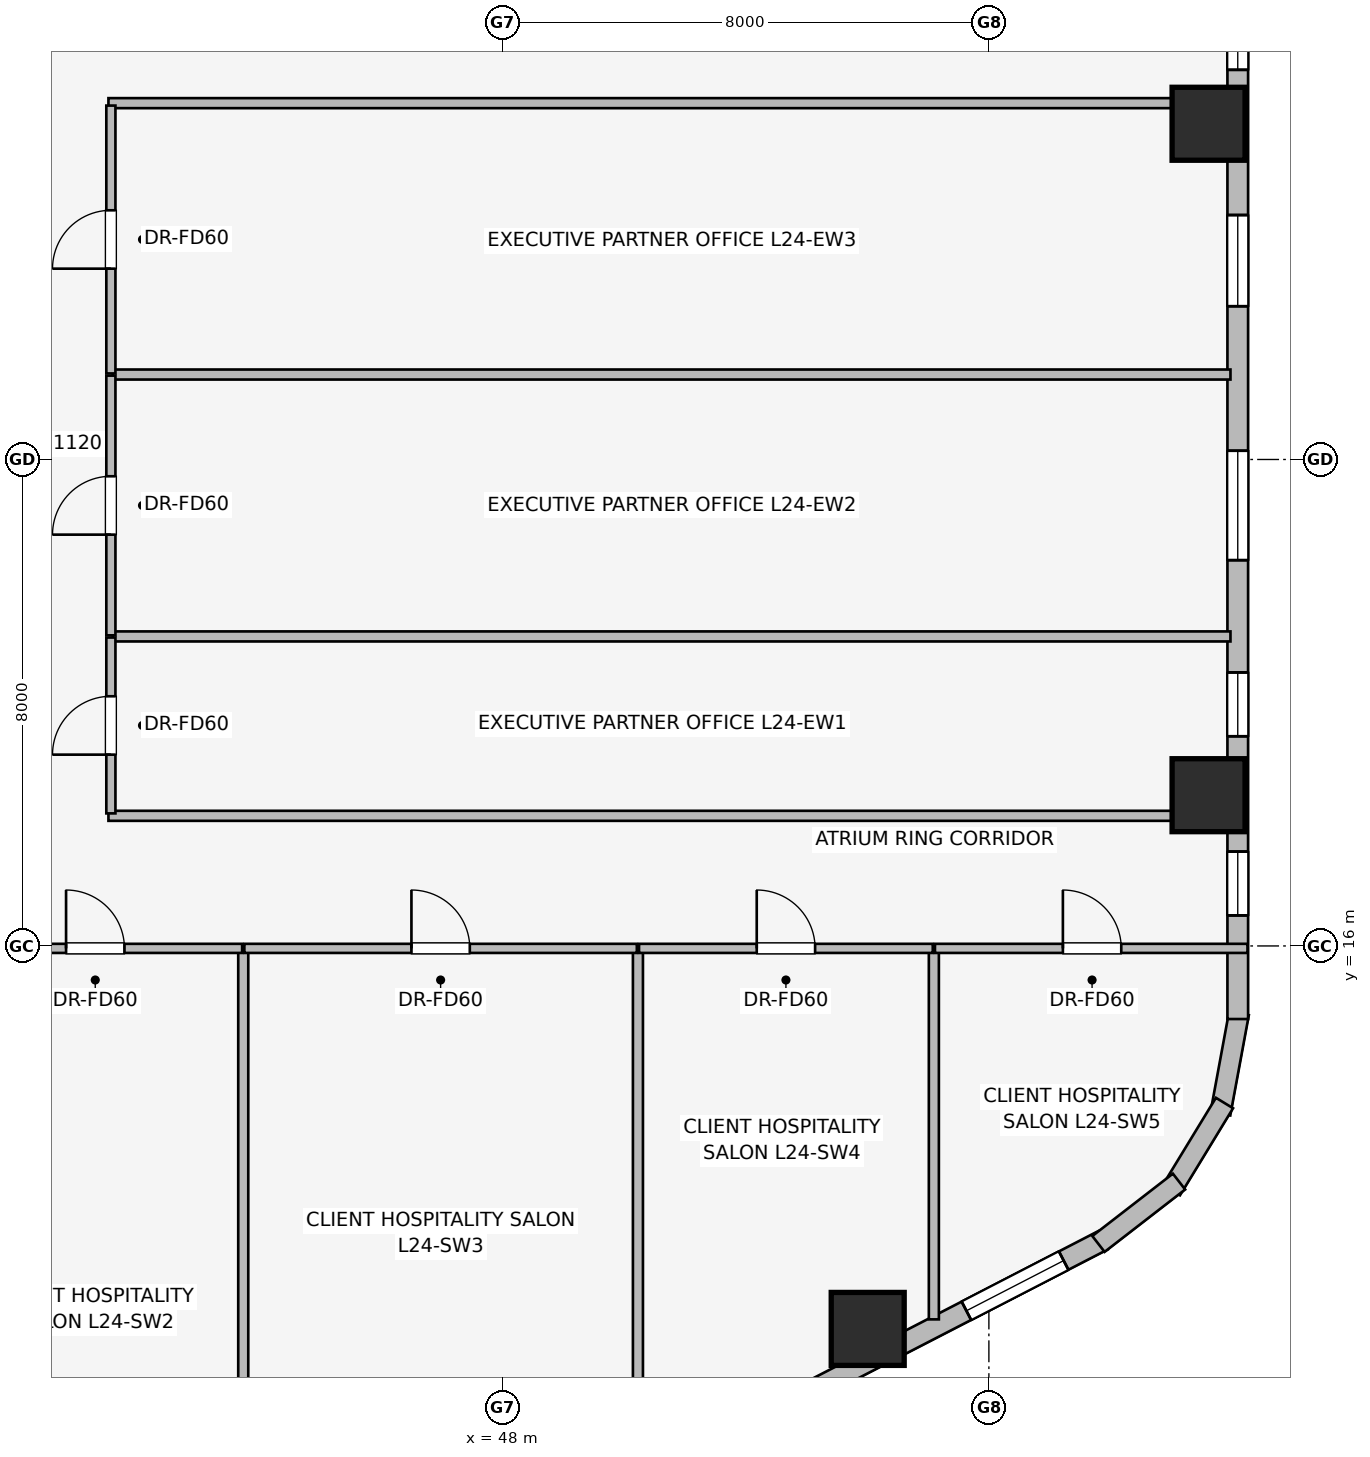
"""IFC4 building model, lengths in metres.
Left out: names, types, materials, properties, quantities, classifications, styles, units other than length and angle.
Written with IfcOpenShell. Run it as: python <this file> out.ifc"""

import sys

from ifc_helpers import new_model, si_unit, direction, frame, frame_2d, origin, origin_2d, place, context, subcontext, project, spatial, rectangle, extrude, element, fill, save


model = new_model("IFC4")
c1 = context("Model", 3, precision=1e-05, world=origin(), true_north=direction((0.0, 1.0)))
c2 = subcontext(c1, "Body", "Model", "MODEL_VIEW")
j1 = project(units=[si_unit("LENGTHUNIT", "METRE"), si_unit("PLANEANGLEUNIT", "RADIAN")], contexts=[c1])
p1 = place(None, origin())
s1 = spatial("IfcSite", under=j1, at=p1, CompositionType="ELEMENT")
p2 = place(p1, origin())
s2 = spatial("IfcBuilding", under=s1, at=p2, CompositionType="ELEMENT")
p3 = place(p2, frame((0.0, 0.0, 92.7)))
s3 = spatial("IfcBuildingStorey", under=s2, at=p3, CompositionType="ELEMENT", Elevation=92.7)
for number, where, z_axis, x_axis in (
    (1, (54.007, 9.702, 0.0), (0.0, 0.0, 1.0), (1.0, 0.0, 0.0)),
    (2, (59.613, 18.479, 0.0), (0.0, 0.0, 1.0), (1.0, 0.0, 0.0)),
    (3, (59.613, 29.521, 0.0), (0.0, 0.0, 1.0), (1.0, 0.0, 0.0)),
):
    element("IfcColumn", number, at=place(p3, frame(where, z_axis=z_axis, x_axis=x_axis)), inside=s3, PredefinedType="COLUMN", context=c2, shape_type="SweptSolid", body=[
        extrude(rectangle(XDim=1.2, YDim=1.2, at=origin_2d()), origin(), (0.0, 0.0, 1.0), 3.65),
    ])
p4 = place(p3, frame((57.876, 11.159, 0.0), z_axis=(0.0, 0.0, 1.0), x_axis=(-0.888634413993, -0.458616264721, 0.0)))
e4 = element("IfcWall", 4, at=p4, inside=s3, PredefinedType="STANDARD", context=c2, shape_type="SweptSolid", body=[
    extrude(rectangle(XDim=20.531, YDim=0.34, at=frame_2d((10.266, 0.0))), origin(), (0.0, 0.0, 1.0), 2.634),
])
p5 = place(p4, frame((0.727, 0.0, 0.75)))
e5 = element("IfcOpeningElement", 5, at=p5, cuts=e4, PredefinedType="OPENING", context=c2, shape_type="SweptSolid", body=[
    extrude(rectangle(XDim=1.8, YDim=1.5, at=frame_2d((0.9, 0.75))), frame((0.0, 0.18, 0.0), z_axis=(0.0, -1.0, 0.0), x_axis=(1.0, 0.0, 0.0)), (0.0, 0.0, 1.0), 0.36),
])
p6 = place(p4, frame((5.764, 0.0, 0.75)))
e6 = element("IfcOpeningElement", 6, at=p6, cuts=e4, PredefinedType="OPENING", context=c2, shape_type="SweptSolid", body=[
    extrude(rectangle(XDim=1.5, YDim=1.5, at=frame_2d((0.75, 0.75))), frame((0.0, 0.18, 0.0), z_axis=(0.0, -1.0, 0.0), x_axis=(1.0, 0.0, 0.0)), (0.0, 0.0, 1.0), 0.36),
])
p7 = place(p4, frame((9.652, 0.0, 0.75)))
e7 = element("IfcOpeningElement", 7, at=p7, cuts=e4, PredefinedType="OPENING", context=c2, shape_type="SweptSolid", body=[
    extrude(rectangle(XDim=1.8, YDim=1.5, at=frame_2d((0.9, 0.75))), frame((0.0, 0.18, 0.0), z_axis=(0.0, -1.0, 0.0), x_axis=(1.0, 0.0, 0.0)), (0.0, 0.0, 1.0), 0.36),
])
p8 = place(p4, frame((12.942, 0.0, 0.75)))
e8 = element("IfcOpeningElement", 8, at=p8, cuts=e4, PredefinedType="OPENING", context=c2, shape_type="SweptSolid", body=[
    extrude(rectangle(XDim=1.8, YDim=1.5, at=frame_2d((0.9, 0.75))), frame((0.0, 0.18, 0.0), z_axis=(0.0, -1.0, 0.0), x_axis=(1.0, 0.0, 0.0)), (0.0, 0.0, 1.0), 0.36),
])
p9 = place(p4, frame((17.823, 0.0, 0.75)))
e9 = element("IfcOpeningElement", 9, at=p9, cuts=e4, PredefinedType="OPENING", context=c2, shape_type="SweptSolid", body=[
    extrude(rectangle(XDim=1.5, YDim=1.5, at=frame_2d((0.75, 0.75))), frame((0.0, 0.18, 0.0), z_axis=(0.0, -1.0, 0.0), x_axis=(1.0, 0.0, 0.0)), (0.0, 0.0, 1.0), 0.36),
])
p10 = place(p3, frame((60.113, 14.892, 0.0), z_axis=(0.0, 0.0, 1.0), x_axis=(-0.181714143354, -0.983351397063, 0.0)))
e10 = element("IfcWall", 10, at=p10, inside=s3, PredefinedType="STANDARD", context=c2, shape_type="SweptSolid", body=[
    extrude(rectangle(XDim=1.678, YDim=0.33, at=frame_2d((0.839, 0.0))), origin(), (0.0, 0.0, 1.0), 3.34),
])
p11 = place(p3, frame((59.875, 13.417, 0.0), z_axis=(0.0, 0.0, 1.0), x_axis=(-0.520584129191, -0.853810379671, 0.0)))
e11 = element("IfcWall", 11, at=p11, inside=s3, PredefinedType="STANDARD", context=c2, shape_type="SweptSolid", body=[
    extrude(rectangle(XDim=1.677, YDim=0.33, at=frame_2d((0.838, 0.0))), origin(), (0.0, 0.0, 1.0), 3.34),
])
p12 = place(p3, frame((59.127, 12.125, 0.0), z_axis=(0.0, 0.0, 1.0), x_axis=(-0.790691856293, -0.61221433207, 0.0)))
e12 = element("IfcWall", 12, at=p12, inside=s3, PredefinedType="STANDARD", context=c2, shape_type="SweptSolid", body=[
    extrude(rectangle(XDim=1.676, YDim=0.33, at=frame_2d((0.838, 0.0))), origin(), (0.0, 0.0, 1.0), 3.34),
])
p13 = place(p3, frame((60.093, 33.202, 0.0), z_axis=(0.0, 0.0, 1.0), x_axis=(0.0, -1.0, 0.0)))
e13 = element("IfcWall", 13, at=p13, inside=s3, PredefinedType="STANDARD", context=c2, shape_type="SweptSolid", body=[
    extrude(rectangle(XDim=18.404, YDim=0.34, at=frame_2d((9.202, 0.0))), origin(), (0.0, 0.0, 1.0), 2.634),
])
p14 = place(p13, frame((1.744, 0.0, 0.75)))
e14 = element("IfcOpeningElement", 14, at=p14, cuts=e13, PredefinedType="OPENING", context=c2, shape_type="SweptSolid", body=[
    extrude(rectangle(XDim=1.05, YDim=1.4, at=frame_2d((0.525, 0.7))), frame((0.0, 0.18, 0.0), z_axis=(0.0, -1.0, 0.0), x_axis=(1.0, 0.0, 0.0)), (0.0, 0.0, 1.0), 0.36),
])
p15 = place(p13, frame((5.182, 0.0, 0.75)))
e15 = element("IfcOpeningElement", 15, at=p15, cuts=e13, PredefinedType="OPENING", context=c2, shape_type="SweptSolid", body=[
    extrude(rectangle(XDim=1.5, YDim=1.5, at=frame_2d((0.75, 0.75))), frame((0.0, 0.18, 0.0), z_axis=(0.0, -1.0, 0.0), x_axis=(1.0, 0.0, 0.0)), (0.0, 0.0, 1.0), 0.36),
])
p16 = place(p13, frame((9.058, 0.0, 0.75)))
e16 = element("IfcOpeningElement", 16, at=p16, cuts=e13, PredefinedType="OPENING", context=c2, shape_type="SweptSolid", body=[
    extrude(rectangle(XDim=1.8, YDim=1.5, at=frame_2d((0.9, 0.75))), frame((0.0, 0.18, 0.0), z_axis=(0.0, -1.0, 0.0), x_axis=(1.0, 0.0, 0.0)), (0.0, 0.0, 1.0), 0.36),
])
p17 = place(p13, frame((12.704, 0.0, 0.75)))
e17 = element("IfcOpeningElement", 17, at=p17, cuts=e13, PredefinedType="OPENING", context=c2, shape_type="SweptSolid", body=[
    extrude(rectangle(XDim=1.05, YDim=1.4, at=frame_2d((0.525, 0.7))), frame((0.0, 0.18, 0.0), z_axis=(0.0, -1.0, 0.0), x_axis=(1.0, 0.0, 0.0)), (0.0, 0.0, 1.0), 0.36),
])
p18 = place(p13, frame((15.65, 0.0, 0.75)))
e18 = element("IfcOpeningElement", 18, at=p18, cuts=e13, PredefinedType="OPENING", context=c2, shape_type="SweptSolid", body=[
    extrude(rectangle(XDim=1.05, YDim=1.4, at=frame_2d((0.525, 0.7))), frame((0.0, 0.18, 0.0), z_axis=(0.0, -1.0, 0.0), x_axis=(1.0, 0.0, 0.0)), (0.0, 0.0, 1.0), 0.36),
])
for number, where, z_axis, x_axis in (
    (19, (41.52, 18.14, 0.0), (0.0, 0.0, 1.0), (1.0, 0.0, 0.0)),
    (20, (41.52, 29.86, 0.0), (0.0, 0.0, 1.0), (1.0, 0.0, 0.0)),
):
    element("IfcWall", number, at=place(p3, frame(where, z_axis=z_axis, x_axis=x_axis)), inside=s3, PredefinedType="PARTITIONING", context=c2, shape_type="SweptSolid", body=[
        extrude(rectangle(XDim=18.453, YDim=0.165, at=frame_2d((9.227, 0.0))), origin(), (0.0, 0.0, 1.0), 3.34),
    ])
for number, where, z_axis, x_axis in (
    (21, (41.59, 21.09, 0.0), (0.0, 0.0, 1.0), (1.0, 0.0, 0.0)),
    (22, (41.59, 25.397, 0.0), (0.0, 0.0, 1.0), (1.0, 0.0, 0.0)),
):
    element("IfcWall", number, at=place(p3, frame(where, z_axis=z_axis, x_axis=x_axis)), inside=s3, PredefinedType="PARTITIONING", context=c2, shape_type="SweptSolid", body=[
        extrude(rectangle(XDim=18.383, YDim=0.165, at=frame_2d((9.191, 0.0))), origin(), (0.0, 0.0, 1.0), 3.34),
    ])
p19 = place(p3, frame((41.56, 18.18, 0.0), z_axis=(0.0, 0.0, 1.0), x_axis=(0.0, 1.0, 0.0)))
e23 = element("IfcWall", 23, at=p19, inside=s3, PredefinedType="PARTITIONING", context=c2, shape_type="SweptSolid", body=[
    extrude(rectangle(XDim=2.892, YDim=0.15, at=frame_2d((1.446, 0.0))), origin(), (0.0, 0.0, 1.0), 3.34),
])
p20 = place(p19, frame((0.966, 0.0, 0.0)))
e24 = element("IfcOpeningElement", 24, at=p20, cuts=e23, PredefinedType="OPENING", context=c2, shape_type="SweptSolid", body=[
    extrude(rectangle(XDim=0.96, YDim=2.0, at=frame_2d((0.48, 1.0))), frame((0.0, 0.085, 0.0), z_axis=(0.0, -1.0, 0.0), x_axis=(1.0, 0.0, 0.0)), (0.0, 0.0, 1.0), 0.17),
])
p21 = place(p3, frame((41.56, 21.108, 0.0), z_axis=(0.0, 0.0, 1.0), x_axis=(0.0, 1.0, 0.0)))
e25 = element("IfcWall", 25, at=p21, inside=s3, PredefinedType="PARTITIONING", context=c2, shape_type="SweptSolid", body=[
    extrude(rectangle(XDim=4.271, YDim=0.15, at=frame_2d((2.135, 0.0))), origin(), (0.0, 0.0, 1.0), 3.34),
])
p22 = place(p21, frame((1.656, 0.0, 0.0)))
e26 = element("IfcOpeningElement", 26, at=p22, cuts=e25, PredefinedType="OPENING", context=c2, shape_type="SweptSolid", body=[
    extrude(rectangle(XDim=0.96, YDim=2.0, at=frame_2d((0.48, 1.0))), frame((0.0, 0.085, 0.0), z_axis=(0.0, -1.0, 0.0), x_axis=(1.0, 0.0, 0.0)), (0.0, 0.0, 1.0), 0.17),
])
p23 = place(p3, frame((41.56, 25.415, 0.0), z_axis=(0.0, 0.0, 1.0), x_axis=(0.0, 1.0, 0.0)))
e27 = element("IfcWall", 27, at=p23, inside=s3, PredefinedType="PARTITIONING", context=c2, shape_type="SweptSolid", body=[
    extrude(rectangle(XDim=4.405, YDim=0.15, at=frame_2d((2.203, 0.0))), origin(), (0.0, 0.0, 1.0), 3.34),
])
p24 = place(p23, frame((1.723, 0.0, 0.0)))
e28 = element("IfcOpeningElement", 28, at=p24, cuts=e27, PredefinedType="OPENING", context=c2, shape_type="SweptSolid", body=[
    extrude(rectangle(XDim=0.96, YDim=2.0, at=frame_2d((0.48, 1.0))), frame((0.0, 0.085, 0.0), z_axis=(0.0, -1.0, 0.0), x_axis=(1.0, 0.0, 0.0)), (0.0, 0.0, 1.0), 0.17),
])
p25 = place(p3, frame((43.737, 3.997, 0.0), z_axis=(0.0, 0.0, 1.0), x_axis=(0.0, 1.0, 0.0)))
e29 = element("IfcWall", 29, at=p25, inside=s3, PredefinedType="PARTITIONING", context=c2, shape_type="SweptSolid", body=[
    extrude(rectangle(XDim=11.933, YDim=0.165, at=frame_2d((5.966, 0.0))), origin(), (0.0, 0.0, 1.0), 3.34),
])
p26 = place(p3, frame((50.228, 7.347, 0.0), z_axis=(0.0, 0.0, 1.0), x_axis=(0.0, 1.0, 0.0)))
e30 = element("IfcWall", 30, at=p26, inside=s3, PredefinedType="PARTITIONING", context=c2, shape_type="SweptSolid", body=[
    extrude(rectangle(XDim=8.583, YDim=0.165, at=frame_2d((4.292, 0.0))), origin(), (0.0, 0.0, 1.0), 3.34),
])
p27 = place(p3, frame((55.095, 9.859, 0.0), z_axis=(0.0, 0.0, 1.0), x_axis=(0.0, 1.0, 0.0)))
e31 = element("IfcWall", 31, at=p27, inside=s3, PredefinedType="PARTITIONING", context=c2, shape_type="SweptSolid", body=[
    extrude(rectangle(XDim=6.071, YDim=0.165, at=frame_2d((3.036, 0.0))), origin(), (0.0, 0.0, 1.0), 3.34),
])
p28 = place(p3, frame((38.887, 15.96, 0.0), z_axis=(0.0, 0.0, 1.0), x_axis=(1.0, 0.0, 0.0)))
e32 = element("IfcWall", 32, at=p28, inside=s3, PredefinedType="PARTITIONING", context=c2, shape_type="SweptSolid", body=[
    extrude(rectangle(XDim=4.832, YDim=0.15, at=frame_2d((2.416, 0.0))), origin(), (0.0, 0.0, 1.0), 3.34),
])
p29 = place(p28, frame((1.936, 0.0, 0.0)))
e33 = element("IfcOpeningElement", 33, at=p29, cuts=e32, PredefinedType="OPENING", context=c2, shape_type="SweptSolid", body=[
    extrude(rectangle(XDim=0.96, YDim=2.0, at=frame_2d((0.48, 1.0))), frame((0.0, 0.085, 0.0), z_axis=(0.0, -1.0, 0.0), x_axis=(1.0, 0.0, 0.0)), (0.0, 0.0, 1.0), 0.17),
])
p30 = place(p3, frame((43.755, 15.96, 0.0), z_axis=(0.0, 0.0, 1.0), x_axis=(1.0, 0.0, 0.0)))
e34 = element("IfcWall", 34, at=p30, inside=s3, PredefinedType="PARTITIONING", context=c2, shape_type="SweptSolid", body=[
    extrude(rectangle(XDim=6.455, YDim=0.15, at=frame_2d((3.228, 0.0))), origin(), (0.0, 0.0, 1.0), 3.34),
])
p31 = place(p30, frame((2.748, 0.0, 0.0)))
e35 = element("IfcOpeningElement", 35, at=p31, cuts=e34, PredefinedType="OPENING", context=c2, shape_type="SweptSolid", body=[
    extrude(rectangle(XDim=0.96, YDim=2.0, at=frame_2d((0.48, 1.0))), frame((0.0, 0.085, 0.0), z_axis=(0.0, -1.0, 0.0), x_axis=(1.0, 0.0, 0.0)), (0.0, 0.0, 1.0), 0.17),
])
p32 = place(p3, frame((50.246, 15.96, 0.0), z_axis=(0.0, 0.0, 1.0), x_axis=(1.0, 0.0, 0.0)))
e36 = element("IfcWall", 36, at=p32, inside=s3, PredefinedType="PARTITIONING", context=c2, shape_type="SweptSolid", body=[
    extrude(rectangle(XDim=4.831, YDim=0.15, at=frame_2d((2.416, 0.0))), origin(), (0.0, 0.0, 1.0), 3.34),
])
p33 = place(p32, frame((1.936, 0.0, 0.0)))
e37 = element("IfcOpeningElement", 37, at=p33, cuts=e36, PredefinedType="OPENING", context=c2, shape_type="SweptSolid", body=[
    extrude(rectangle(XDim=0.96, YDim=2.0, at=frame_2d((0.48, 1.0))), frame((0.0, 0.085, 0.0), z_axis=(0.0, -1.0, 0.0), x_axis=(1.0, 0.0, 0.0)), (0.0, 0.0, 1.0), 0.17),
])
p34 = place(p3, frame((55.113, 15.96, 0.0), z_axis=(0.0, 0.0, 1.0), x_axis=(1.0, 0.0, 0.0)))
e38 = element("IfcWall", 38, at=p34, inside=s3, PredefinedType="PARTITIONING", context=c2, shape_type="SweptSolid", body=[
    extrude(rectangle(XDim=5.14, YDim=0.15, at=frame_2d((2.57, 0.0))), origin(), (0.0, 0.0, 1.0), 3.34),
])
p35 = place(p34, frame((2.104, 0.0, 0.0)))
e39 = element("IfcOpeningElement", 39, at=p35, cuts=e38, PredefinedType="OPENING", context=c2, shape_type="SweptSolid", body=[
    extrude(rectangle(XDim=0.96, YDim=2.0, at=frame_2d((0.48, 1.0))), frame((0.0, 0.085, 0.0), z_axis=(0.0, -1.0, 0.0), x_axis=(1.0, 0.0, 0.0)), (0.0, 0.0, 1.0), 0.17),
])
p36 = place(p5, origin())
e40 = element("IfcWindow", 40, at=p36, inside=s3, PartitioningType="SINGLE_PANEL", PredefinedType="WINDOW", context=c2, shape_type="SweptSolid", body=[
    extrude(rectangle(XDim=1.8, YDim=1.5, at=frame_2d((0.9, 0.75))), frame((0.0, 0.03, 0.0), z_axis=(0.0, -1.0, 0.0), x_axis=(1.0, 0.0, 0.0)), (0.0, 0.0, 1.0), 0.06),
])
fill(e5, e40)
p37 = place(p14, origin())
e41 = element("IfcWindow", 41, at=p37, inside=s3, PartitioningType="SINGLE_PANEL", PredefinedType="WINDOW", context=c2, shape_type="SweptSolid", body=[
    extrude(rectangle(XDim=1.05, YDim=1.4, at=frame_2d((0.525, 0.7))), frame((0.0, 0.03, 0.0), z_axis=(0.0, -1.0, 0.0), x_axis=(1.0, 0.0, 0.0)), (0.0, 0.0, 1.0), 0.06),
])
fill(e14, e41)
p38 = place(p15, origin())
e42 = element("IfcWindow", 42, at=p38, inside=s3, PartitioningType="SINGLE_PANEL", PredefinedType="WINDOW", context=c2, shape_type="SweptSolid", body=[
    extrude(rectangle(XDim=1.5, YDim=1.5, at=frame_2d((0.75, 0.75))), frame((0.0, 0.03, 0.0), z_axis=(0.0, -1.0, 0.0), x_axis=(1.0, 0.0, 0.0)), (0.0, 0.0, 1.0), 0.06),
])
fill(e15, e42)
p39 = place(p16, origin())
e43 = element("IfcWindow", 43, at=p39, inside=s3, PartitioningType="SINGLE_PANEL", PredefinedType="WINDOW", context=c2, shape_type="SweptSolid", body=[
    extrude(rectangle(XDim=1.8, YDim=1.5, at=frame_2d((0.9, 0.75))), frame((0.0, 0.03, 0.0), z_axis=(0.0, -1.0, 0.0), x_axis=(1.0, 0.0, 0.0)), (0.0, 0.0, 1.0), 0.06),
])
fill(e16, e43)
p40 = place(p17, origin())
e44 = element("IfcWindow", 44, at=p40, inside=s3, PartitioningType="SINGLE_PANEL", PredefinedType="WINDOW", context=c2, shape_type="SweptSolid", body=[
    extrude(rectangle(XDim=1.05, YDim=1.4, at=frame_2d((0.525, 0.7))), frame((0.0, 0.03, 0.0), z_axis=(0.0, -1.0, 0.0), x_axis=(1.0, 0.0, 0.0)), (0.0, 0.0, 1.0), 0.06),
])
fill(e17, e44)
p41 = place(p18, origin())
e45 = element("IfcWindow", 45, at=p41, inside=s3, PartitioningType="SINGLE_PANEL", PredefinedType="WINDOW", context=c2, shape_type="SweptSolid", body=[
    extrude(rectangle(XDim=1.05, YDim=1.4, at=frame_2d((0.525, 0.7))), frame((0.0, 0.03, 0.0), z_axis=(0.0, -1.0, 0.0), x_axis=(1.0, 0.0, 0.0)), (0.0, 0.0, 1.0), 0.06),
])
fill(e18, e45)
p42 = place(p20, origin())
e46 = element("IfcDoor", 46, at=p42, inside=s3, OperationType="SINGLE_SWING_LEFT", PredefinedType="DOOR", context=c2, shape_type="SweptSolid", body=[
    extrude(rectangle(XDim=0.96, YDim=2.0, at=frame_2d((0.48, 1.0))), frame((0.0, 0.025, 0.0), z_axis=(0.0, -1.0, 0.0), x_axis=(1.0, 0.0, 0.0)), (0.0, 0.0, 1.0), 0.05),
])
fill(e24, e46)
p43 = place(p22, origin())
e47 = element("IfcDoor", 47, at=p43, inside=s3, OperationType="SINGLE_SWING_LEFT", PredefinedType="DOOR", context=c2, shape_type="SweptSolid", body=[
    extrude(rectangle(XDim=0.96, YDim=2.0, at=frame_2d((0.48, 1.0))), frame((0.0, 0.025, 0.0), z_axis=(0.0, -1.0, 0.0), x_axis=(1.0, 0.0, 0.0)), (0.0, 0.0, 1.0), 0.05),
])
fill(e26, e47)
p44 = place(p24, origin())
e48 = element("IfcDoor", 48, at=p44, inside=s3, OperationType="SINGLE_SWING_LEFT", PredefinedType="DOOR", context=c2, shape_type="SweptSolid", body=[
    extrude(rectangle(XDim=0.96, YDim=2.0, at=frame_2d((0.48, 1.0))), frame((0.0, 0.025, 0.0), z_axis=(0.0, -1.0, 0.0), x_axis=(1.0, 0.0, 0.0)), (0.0, 0.0, 1.0), 0.05),
])
fill(e28, e48)
p45 = place(p29, origin())
e49 = element("IfcDoor", 49, at=p45, inside=s3, OperationType="SINGLE_SWING_LEFT", PredefinedType="DOOR", context=c2, shape_type="SweptSolid", body=[
    extrude(rectangle(XDim=0.96, YDim=2.0, at=frame_2d((0.48, 1.0))), frame((0.0, 0.025, 0.0), z_axis=(0.0, -1.0, 0.0), x_axis=(1.0, 0.0, 0.0)), (0.0, 0.0, 1.0), 0.05),
])
fill(e33, e49)
p46 = place(p31, origin())
e50 = element("IfcDoor", 50, at=p46, inside=s3, OperationType="SINGLE_SWING_LEFT", PredefinedType="DOOR", context=c2, shape_type="SweptSolid", body=[
    extrude(rectangle(XDim=0.96, YDim=2.0, at=frame_2d((0.48, 1.0))), frame((0.0, 0.025, 0.0), z_axis=(0.0, -1.0, 0.0), x_axis=(1.0, 0.0, 0.0)), (0.0, 0.0, 1.0), 0.05),
])
fill(e35, e50)
p47 = place(p33, origin())
e51 = element("IfcDoor", 51, at=p47, inside=s3, OperationType="SINGLE_SWING_LEFT", PredefinedType="DOOR", context=c2, shape_type="SweptSolid", body=[
    extrude(rectangle(XDim=0.96, YDim=2.0, at=frame_2d((0.48, 1.0))), frame((0.0, 0.025, 0.0), z_axis=(0.0, -1.0, 0.0), x_axis=(1.0, 0.0, 0.0)), (0.0, 0.0, 1.0), 0.05),
])
fill(e37, e51)
p48 = place(p35, origin())
e52 = element("IfcDoor", 52, at=p48, inside=s3, OperationType="SINGLE_SWING_LEFT", PredefinedType="DOOR", context=c2, shape_type="SweptSolid", body=[
    extrude(rectangle(XDim=0.96, YDim=2.0, at=frame_2d((0.48, 1.0))), frame((0.0, 0.025, 0.0), z_axis=(0.0, -1.0, 0.0), x_axis=(1.0, 0.0, 0.0)), (0.0, 0.0, 1.0), 0.05),
])
fill(e39, e52)
save(model, sys.argv[1])
